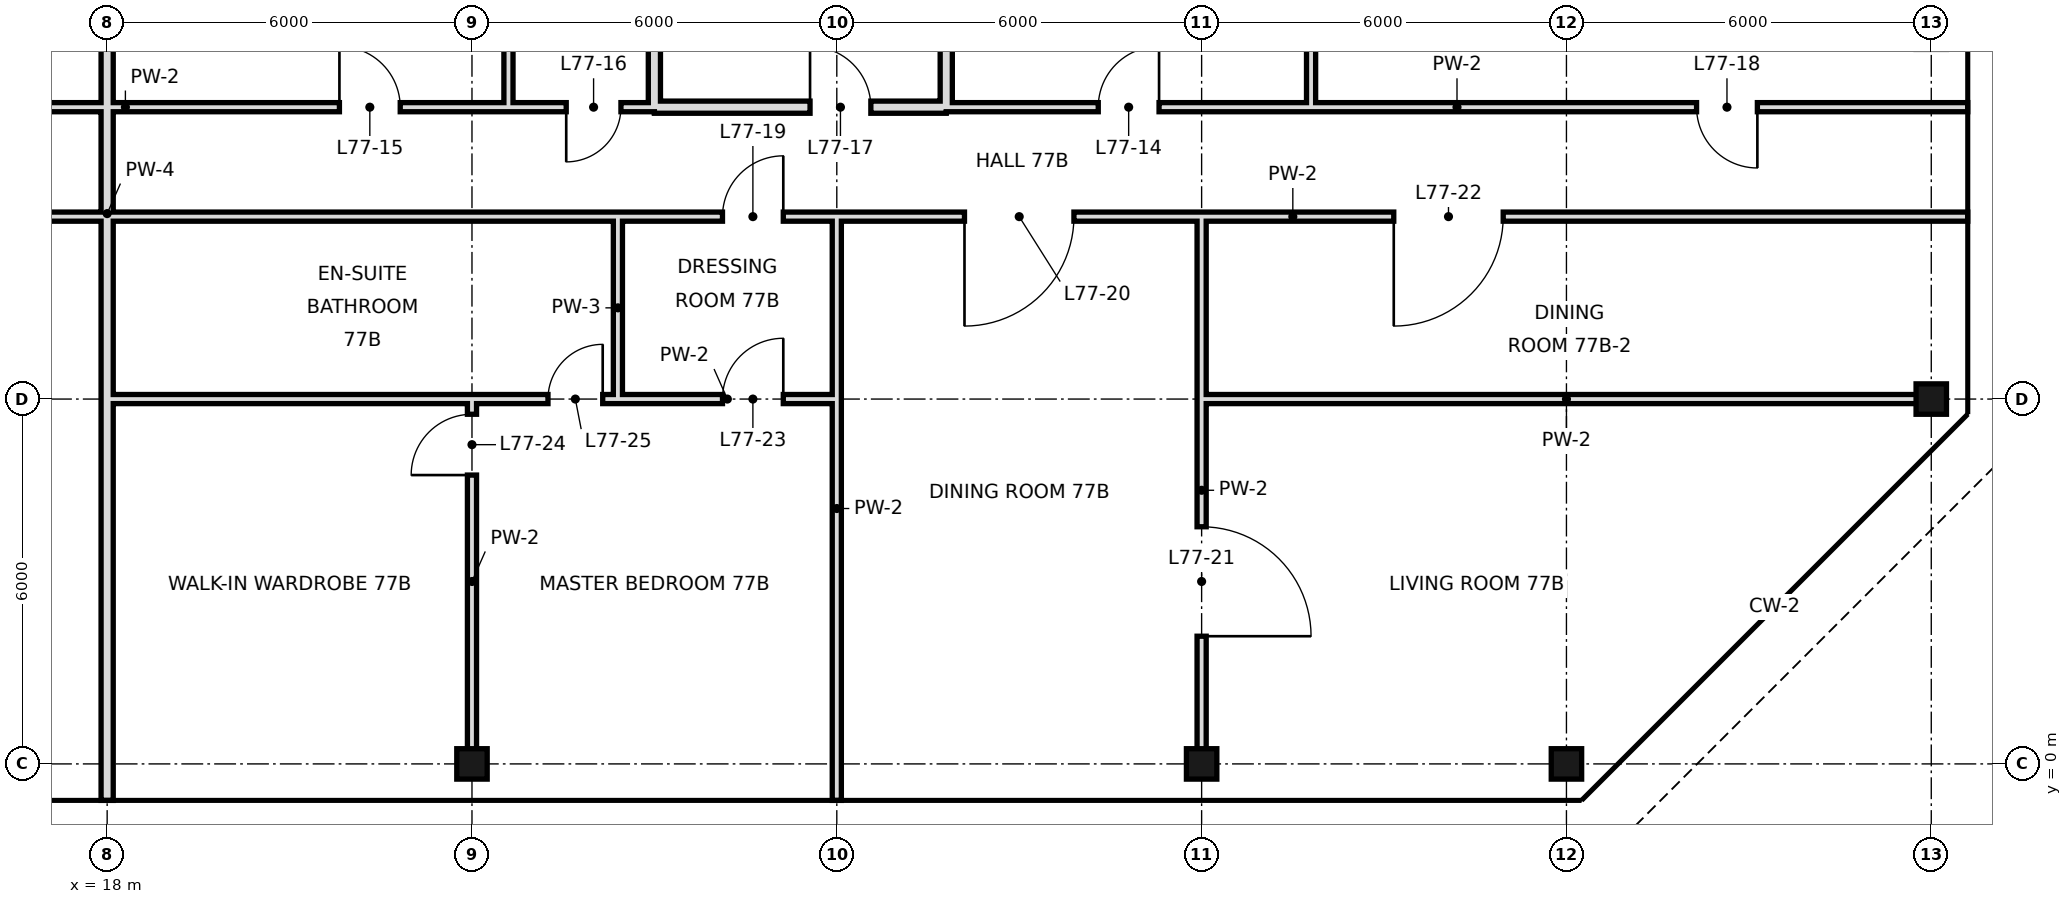
"""IFC4 building model, lengths in metres.
Left out: names, types, materials, properties, quantities, classifications, styles, units other than length and angle.
Written with IfcOpenShell. Run it as: python <this file> out.ifc"""

import sys

from ifc_helpers import new_model, si_unit, direction, frame, frame_2d, origin, origin_2d, place, context, subcontext, project, spatial, rectangle, hollow_rectangle, extrude, element, fill, save


model = new_model("IFC4")
c1 = context("Model", 3, precision=1e-05, world=origin(), true_north=direction((0.0, 1.0)))
c2 = subcontext(c1, "Body", "Model", "MODEL_VIEW")
j1 = project(units=[si_unit("LENGTHUNIT", "METRE"), si_unit("PLANEANGLEUNIT", "RADIAN")], contexts=[c1])
p1 = place(None, origin())
s1 = spatial("IfcSite", under=j1, at=p1, CompositionType="ELEMENT")
p2 = place(p1, origin())
s2 = spatial("IfcBuilding", under=s1, at=p2, CompositionType="ELEMENT")
p3 = place(p2, frame((0.0, 0.0, 323.2)))
s3 = spatial("IfcBuildingStorey", under=s2, at=p3, CompositionType="ELEMENT", Elevation=323.2)
for number, where, z_axis, x_axis in (
    (1, (24.0, 0.0, 0.0), (0.0, 0.0, 1.0), (1.0, 0.0, 0.0)),
    (2, (36.0, 0.0, 0.0), (0.0, 0.0, 1.0), (1.0, 0.0, 0.0)),
    (3, (42.0, 0.0, 0.0), (0.0, 0.0, 1.0), (1.0, 0.0, 0.0)),
    (4, (48.0, 6.0, 0.0), (0.0, 0.0, 1.0), (1.0, 0.0, 0.0)),
):
    element("IfcColumn", number, at=place(p3, frame(where, z_axis=z_axis, x_axis=x_axis)), inside=s3, PredefinedType="COLUMN", context=c2, shape_type="SweptSolid", body=[
        extrude(hollow_rectangle(XDim=0.5, YDim=0.5, WallThickness=0.025, at=origin_2d()), origin(), (0.0, 0.0, 1.0), 3.6),
    ])
p4 = place(p3, frame((18.0, -0.6, 0.0), z_axis=(0.0, 0.0, 1.0), x_axis=(0.0, 1.0, 0.0)))
e5 = element("IfcWall", 5, at=p4, inside=s3, PredefinedType="SOLIDWALL", context=c2, shape_type="SweptSolid", body=[
    extrude(rectangle(XDim=19.3, YDim=0.2, at=frame_2d((9.65, 0.0))), origin(), (0.0, 0.0, 1.0), 2.72),
])
p5 = place(p3, frame((24.0, 0.0, 0.0), z_axis=(0.0, 0.0, 1.0), x_axis=(0.0, 1.0, 0.0)))
e6 = element("IfcWall", 6, at=p5, inside=s3, PredefinedType="PARTITIONING", context=c2, shape_type="SweptSolid", body=[
    extrude(rectangle(XDim=6.0, YDim=0.15, at=frame_2d((3.0, 0.0))), origin(), (0.0, 0.0, 1.0), 2.72),
])
p6 = place(p5, frame((4.75, 0.0, 0.0)))
e7 = element("IfcOpeningElement", 7, at=p6, cuts=e6, PredefinedType="OPENING", context=c2, shape_type="SweptSolid", body=[
    extrude(rectangle(XDim=1.0, YDim=2.4, at=frame_2d((0.5, 1.2))), frame((0.0, 0.085, 0.0), z_axis=(0.0, -1.0, 0.0), x_axis=(1.0, 0.0, 0.0)), (0.0, 0.0, 1.0), 0.17),
])
p7 = place(p3, frame((24.6, 10.8, 0.0), z_axis=(0.0, 0.0, 1.0), x_axis=(0.0, 1.0, 0.0)))
e8 = element("IfcWall", 8, at=p7, inside=s3, PredefinedType="PARTITIONING", context=c2, shape_type="SweptSolid", body=[
    extrude(rectangle(XDim=7.9, YDim=0.15, at=frame_2d((3.95, 0.0))), origin(), (0.0, 0.0, 1.0), 3.42),
])
p8 = place(p3, frame((26.4, 6.0, 0.0), z_axis=(0.0, 0.0, 1.0), x_axis=(0.0, 1.0, 0.0)))
e9 = element("IfcWall", 9, at=p8, inside=s3, PredefinedType="PARTITIONING", context=c2, shape_type="SweptSolid", body=[
    extrude(rectangle(XDim=3.0, YDim=0.15, at=frame_2d((1.5, 0.0))), origin(), (0.0, 0.0, 1.0), 3.42),
])
p9 = place(p3, frame((27.0, 10.8, 0.0), z_axis=(0.0, 0.0, 1.0), x_axis=(0.0, 1.0, 0.0)))
e10 = element("IfcWall", 10, at=p9, inside=s3, PredefinedType="SOLIDWALL", context=c2, shape_type="SweptSolid", body=[
    extrude(rectangle(XDim=7.9, YDim=0.2, at=frame_2d((3.95, 0.0))), origin(), (0.0, 0.0, 1.0), 2.72),
])
p10 = place(p3, frame((30.0, -0.6, 0.0), z_axis=(0.0, 0.0, 1.0), x_axis=(0.0, 1.0, 0.0)))
e11 = element("IfcWall", 11, at=p10, inside=s3, PredefinedType="PARTITIONING", context=c2, shape_type="SweptSolid", body=[
    extrude(rectangle(XDim=9.6, YDim=0.15, at=frame_2d((4.8, 0.0))), origin(), (0.0, 0.0, 1.0), 2.72),
])
p11 = place(p3, frame((31.8, 10.8, 0.0), z_axis=(0.0, 0.0, 1.0), x_axis=(0.0, 1.0, 0.0)))
e12 = element("IfcWall", 12, at=p11, inside=s3, PredefinedType="SOLIDWALL", context=c2, shape_type="SweptSolid", body=[
    extrude(rectangle(XDim=7.9, YDim=0.2, at=frame_2d((3.95, 0.0))), origin(), (0.0, 0.0, 1.0), 3.42),
])
p12 = place(p3, frame((36.0, 0.0, 0.0), z_axis=(0.0, 0.0, 1.0), x_axis=(0.0, 1.0, 0.0)))
e13 = element("IfcWall", 13, at=p12, inside=s3, PredefinedType="PARTITIONING", context=c2, shape_type="SweptSolid", body=[
    extrude(rectangle(XDim=9.0, YDim=0.15, at=frame_2d((4.5, 0.0))), origin(), (0.0, 0.0, 1.0), 2.72),
])
p13 = place(p12, frame((2.1, 0.0, 0.0)))
e14 = element("IfcOpeningElement", 14, at=p13, cuts=e13, PredefinedType="OPENING", context=c2, shape_type="SweptSolid", body=[
    extrude(rectangle(XDim=1.8, YDim=2.4, at=frame_2d((0.9, 1.2))), frame((0.0, 0.085, 0.0), z_axis=(0.0, -1.0, 0.0), x_axis=(1.0, 0.0, 0.0)), (0.0, 0.0, 1.0), 0.17),
])
p14 = place(p3, frame((37.8, 10.8, 0.0), z_axis=(0.0, 0.0, 1.0), x_axis=(0.0, 1.0, 0.0)))
e15 = element("IfcWall", 15, at=p14, inside=s3, PredefinedType="PARTITIONING", context=c2, shape_type="SweptSolid", body=[
    extrude(rectangle(XDim=7.9, YDim=0.15, at=frame_2d((3.95, 0.0))), origin(), (0.0, 0.0, 1.0), 3.42),
])
p15 = place(p3, frame((27.0, 10.8, 0.0), z_axis=(0.0, 0.0, 1.0), x_axis=(1.0, 0.0, 0.0)))
e16 = element("IfcWall", 16, at=p15, inside=s3, PredefinedType="SOLIDWALL", context=c2, shape_type="SweptSolid", body=[
    extrude(rectangle(XDim=4.8, YDim=0.2, at=frame_2d((2.4, 0.0))), origin(), (0.0, 0.0, 1.0), 2.72),
])
p16 = place(p15, frame((2.56, 0.0, 0.0)))
e17 = element("IfcOpeningElement", 17, at=p16, cuts=e16, PredefinedType="OPENING", context=c2, shape_type="SweptSolid", body=[
    extrude(rectangle(XDim=1.0, YDim=2.4, at=frame_2d((0.5, 1.2))), frame((0.0, 0.11, 0.0), z_axis=(0.0, -1.0, 0.0), x_axis=(1.0, 0.0, 0.0)), (0.0, 0.0, 1.0), 0.22),
])
p17 = place(p3, frame((12.0, 10.8, 0.0), z_axis=(0.0, 0.0, 1.0), x_axis=(1.0, 0.0, 0.0)))
e18 = element("IfcWall", 18, at=p17, inside=s3, PredefinedType="PARTITIONING", context=c2, shape_type="SweptSolid", body=[
    extrude(rectangle(XDim=12.6, YDim=0.15, at=frame_2d((6.3, 0.0))), origin(), (0.0, 0.0, 1.0), 3.42),
])
p18 = place(p17, frame((2.5, 0.0, 0.0)))
e19 = element("IfcOpeningElement", 19, at=p18, cuts=e18, PredefinedType="OPENING", context=c2, shape_type="SweptSolid", body=[
    extrude(rectangle(XDim=1.0, YDim=2.4, at=frame_2d((0.5, 1.2))), frame((0.0, 0.085, 0.0), z_axis=(0.0, -1.0, 0.0), x_axis=(1.0, 0.0, 0.0)), (0.0, 0.0, 1.0), 0.17),
])
p19 = place(p17, frame((9.82, 0.0, 0.0)))
e20 = element("IfcOpeningElement", 20, at=p19, cuts=e18, PredefinedType="OPENING", context=c2, shape_type="SweptSolid", body=[
    extrude(rectangle(XDim=1.0, YDim=2.4, at=frame_2d((0.5, 1.2))), frame((0.0, 0.085, 0.0), z_axis=(0.0, -1.0, 0.0), x_axis=(1.0, 0.0, 0.0)), (0.0, 0.0, 1.0), 0.17),
])
p20 = place(p3, frame((31.8, 10.8, 0.0), z_axis=(0.0, 0.0, 1.0), x_axis=(1.0, 0.0, 0.0)))
e21 = element("IfcWall", 21, at=p20, inside=s3, PredefinedType="PARTITIONING", context=c2, shape_type="SweptSolid", body=[
    extrude(rectangle(XDim=16.8, YDim=0.15, at=frame_2d((8.4, 0.0))), origin(), (0.0, 0.0, 1.0), 3.42),
])
p21 = place(p20, frame((2.5, 0.0, 0.0)))
e22 = element("IfcOpeningElement", 22, at=p21, cuts=e21, PredefinedType="OPENING", context=c2, shape_type="SweptSolid", body=[
    extrude(rectangle(XDim=1.0, YDim=2.4, at=frame_2d((0.5, 1.2))), frame((0.0, 0.085, 0.0), z_axis=(0.0, -1.0, 0.0), x_axis=(1.0, 0.0, 0.0)), (0.0, 0.0, 1.0), 0.17),
])
p22 = place(p20, frame((12.34, 0.0, 0.0)))
e23 = element("IfcOpeningElement", 23, at=p22, cuts=e21, PredefinedType="OPENING", context=c2, shape_type="SweptSolid", body=[
    extrude(rectangle(XDim=1.0, YDim=2.4, at=frame_2d((0.5, 1.2))), frame((0.0, 0.085, 0.0), z_axis=(0.0, -1.0, 0.0), x_axis=(1.0, 0.0, 0.0)), (0.0, 0.0, 1.0), 0.17),
])
p23 = place(p3, frame((24.6, 10.8, 0.0), z_axis=(0.0, 0.0, 1.0), x_axis=(1.0, 0.0, 0.0)))
e24 = element("IfcWall", 24, at=p23, inside=s3, PredefinedType="PARTITIONING", context=c2, shape_type="SweptSolid", body=[
    extrude(rectangle(XDim=2.4, YDim=0.15, at=frame_2d((1.2, 0.0))), origin(), (0.0, 0.0, 1.0), 3.42),
])
p24 = place(p23, frame((0.95, 0.0, 0.0)))
e25 = element("IfcOpeningElement", 25, at=p24, cuts=e24, PredefinedType="OPENING", context=c2, shape_type="SweptSolid", body=[
    extrude(rectangle(XDim=0.9, YDim=2.4, at=frame_2d((0.45, 1.2))), frame((0.0, 0.085, 0.0), z_axis=(0.0, -1.0, 0.0), x_axis=(1.0, 0.0, 0.0)), (0.0, 0.0, 1.0), 0.17),
])
p25 = place(p3, frame((26.4, 6.0, 0.0), z_axis=(0.0, 0.0, 1.0), x_axis=(1.0, 0.0, 0.0)))
e26 = element("IfcWall", 26, at=p25, inside=s3, PredefinedType="PARTITIONING", context=c2, shape_type="SweptSolid", body=[
    extrude(rectangle(XDim=3.6, YDim=0.15, at=frame_2d((1.8, 0.0))), origin(), (0.0, 0.0, 1.0), 2.97),
])
p26 = place(p25, frame((1.72, 0.0, 0.0)))
e27 = element("IfcOpeningElement", 27, at=p26, cuts=e26, PredefinedType="OPENING", context=c2, shape_type="SweptSolid", body=[
    extrude(rectangle(XDim=1.0, YDim=2.4, at=frame_2d((0.5, 1.2))), frame((0.0, 0.085, 0.0), z_axis=(0.0, -1.0, 0.0), x_axis=(1.0, 0.0, 0.0)), (0.0, 0.0, 1.0), 0.17),
])
p27 = place(p3, frame((36.0, 6.0, 0.0), z_axis=(0.0, 0.0, 1.0), x_axis=(1.0, 0.0, 0.0)))
e28 = element("IfcWall", 28, at=p27, inside=s3, PredefinedType="PARTITIONING", context=c2, shape_type="SweptSolid", body=[
    extrude(rectangle(XDim=12.0, YDim=0.15, at=frame_2d((6.0, 0.0))), origin(), (0.0, 0.0, 1.0), 2.97),
])
p28 = place(p3, frame((18.0, 6.0, 0.0), z_axis=(0.0, 0.0, 1.0), x_axis=(1.0, 0.0, 0.0)))
e29 = element("IfcWall", 29, at=p28, inside=s3, PredefinedType="PARTITIONING", context=c2, shape_type="SweptSolid", body=[
    extrude(rectangle(XDim=8.4, YDim=0.15, at=frame_2d((4.2, 0.0))), origin(), (0.0, 0.0, 1.0), 2.97),
])
p29 = place(p28, frame((7.25, 0.0, 0.0)))
e30 = element("IfcOpeningElement", 30, at=p29, cuts=e29, PredefinedType="OPENING", context=c2, shape_type="SweptSolid", body=[
    extrude(rectangle(XDim=0.9, YDim=2.4, at=frame_2d((0.45, 1.2))), frame((0.0, 0.085, 0.0), z_axis=(0.0, -1.0, 0.0), x_axis=(1.0, 0.0, 0.0)), (0.0, 0.0, 1.0), 0.17),
])
p30 = place(p3, frame((12.0, 9.0, 0.0), z_axis=(0.0, 0.0, 1.0), x_axis=(1.0, 0.0, 0.0)))
e31 = element("IfcWall", 31, at=p30, inside=s3, PredefinedType="PARTITIONING", context=c2, shape_type="SweptSolid", body=[
    extrude(rectangle(XDim=6.0, YDim=0.15, at=frame_2d((3.0, 0.0))), origin(), (0.0, 0.0, 1.0), 3.42),
])
p31 = place(p30, frame((2.1, 0.0, 0.0)))
e32 = element("IfcOpeningElement", 32, at=p31, cuts=e31, PredefinedType="OPENING", context=c2, shape_type="SweptSolid", body=[
    extrude(rectangle(XDim=1.8, YDim=2.4, at=frame_2d((0.9, 1.2))), frame((0.0, 0.085, 0.0), z_axis=(0.0, -1.0, 0.0), x_axis=(1.0, 0.0, 0.0)), (0.0, 0.0, 1.0), 0.17),
])
p32 = place(p3, frame((26.4, 9.0, 0.0), z_axis=(0.0, 0.0, 1.0), x_axis=(1.0, 0.0, 0.0)))
e33 = element("IfcWall", 33, at=p32, inside=s3, PredefinedType="PARTITIONING", context=c2, shape_type="SweptSolid", body=[
    extrude(rectangle(XDim=22.2, YDim=0.15, at=frame_2d((11.1, 0.0))), origin(), (0.0, 0.0, 1.0), 3.42),
])
p33 = place(p32, frame((1.72, 0.0, 0.0)))
e34 = element("IfcOpeningElement", 34, at=p33, cuts=e33, PredefinedType="OPENING", context=c2, shape_type="SweptSolid", body=[
    extrude(rectangle(XDim=1.0, YDim=2.4, at=frame_2d((0.5, 1.2))), frame((0.0, 0.085, 0.0), z_axis=(0.0, -1.0, 0.0), x_axis=(1.0, 0.0, 0.0)), (0.0, 0.0, 1.0), 0.17),
])
p34 = place(p32, frame((5.7, 0.0, 0.0)))
e35 = element("IfcOpeningElement", 35, at=p34, cuts=e33, PredefinedType="OPENING", context=c2, shape_type="SweptSolid", body=[
    extrude(rectangle(XDim=1.8, YDim=2.4, at=frame_2d((0.9, 1.2))), frame((0.0, 0.085, 0.0), z_axis=(0.0, -1.0, 0.0), x_axis=(1.0, 0.0, 0.0)), (0.0, 0.0, 1.0), 0.17),
])
p35 = place(p32, frame((12.76, 0.0, 0.0)))
e36 = element("IfcOpeningElement", 36, at=p35, cuts=e33, PredefinedType="OPENING", context=c2, shape_type="SweptSolid", body=[
    extrude(rectangle(XDim=1.8, YDim=2.4, at=frame_2d((0.9, 1.2))), frame((0.0, 0.085, 0.0), z_axis=(0.0, -1.0, 0.0), x_axis=(1.0, 0.0, 0.0)), (0.0, 0.0, 1.0), 0.17),
])
p36 = place(p3, frame((18.0, 9.0, 0.0), z_axis=(0.0, 0.0, 1.0), x_axis=(1.0, 0.0, 0.0)))
e37 = element("IfcWall", 37, at=p36, inside=s3, PredefinedType="PARTITIONING", context=c2, shape_type="SweptSolid", body=[
    extrude(rectangle(XDim=8.4, YDim=0.15, at=frame_2d((4.2, 0.0))), origin(), (0.0, 0.0, 1.0), 3.42),
])
p37 = place(p21, frame((1.0, 0.0, 0.0), z_axis=(0.0, 0.0, 1.0), x_axis=(-1.0, 0.0, 0.0)))
e38 = element("IfcDoor", 38, at=p37, inside=s3, OperationType="SINGLE_SWING_LEFT", PredefinedType="DOOR", context=c2, shape_type="SweptSolid", body=[
    extrude(rectangle(XDim=1.0, YDim=2.4, at=frame_2d((0.5, 1.2))), frame((0.0, 0.025, 0.0), z_axis=(0.0, -1.0, 0.0), x_axis=(1.0, 0.0, 0.0)), (0.0, 0.0, 1.0), 0.05),
])
fill(e22, e38)
p38 = place(p19, origin())
e39 = element("IfcDoor", 39, at=p38, inside=s3, OperationType="SINGLE_SWING_LEFT", PredefinedType="DOOR", context=c2, shape_type="SweptSolid", body=[
    extrude(rectangle(XDim=1.0, YDim=2.4, at=frame_2d((0.5, 1.2))), frame((0.0, 0.025, 0.0), z_axis=(0.0, -1.0, 0.0), x_axis=(1.0, 0.0, 0.0)), (0.0, 0.0, 1.0), 0.05),
])
fill(e20, e39)
p39 = place(p24, frame((0.9, 0.0, 0.0), z_axis=(0.0, 0.0, 1.0), x_axis=(-1.0, 0.0, 0.0)))
e40 = element("IfcDoor", 40, at=p39, inside=s3, OperationType="SINGLE_SWING_RIGHT", PredefinedType="DOOR", context=c2, shape_type="SweptSolid", body=[
    extrude(rectangle(XDim=0.9, YDim=2.4, at=frame_2d((0.45, 1.2))), frame((0.0, 0.025, 0.0), z_axis=(0.0, -1.0, 0.0), x_axis=(1.0, 0.0, 0.0)), (0.0, 0.0, 1.0), 0.05),
])
fill(e25, e40)
p40 = place(p16, origin())
e41 = element("IfcDoor", 41, at=p40, inside=s3, OperationType="SINGLE_SWING_LEFT", PredefinedType="DOOR", context=c2, shape_type="SweptSolid", body=[
    extrude(rectangle(XDim=1.0, YDim=2.4, at=frame_2d((0.5, 1.2))), frame((0.0, 0.025, 0.0), z_axis=(0.0, -1.0, 0.0), x_axis=(1.0, 0.0, 0.0)), (0.0, 0.0, 1.0), 0.05),
])
fill(e17, e41)
p41 = place(p22, origin())
e42 = element("IfcDoor", 42, at=p41, inside=s3, OperationType="SINGLE_SWING_RIGHT", PredefinedType="DOOR", context=c2, shape_type="SweptSolid", body=[
    extrude(rectangle(XDim=1.0, YDim=2.4, at=frame_2d((0.5, 1.2))), frame((0.0, 0.025, 0.0), z_axis=(0.0, -1.0, 0.0), x_axis=(1.0, 0.0, 0.0)), (0.0, 0.0, 1.0), 0.05),
])
fill(e23, e42)
p42 = place(p33, frame((1.0, 0.0, 0.0), z_axis=(0.0, 0.0, 1.0), x_axis=(-1.0, 0.0, 0.0)))
e43 = element("IfcDoor", 43, at=p42, inside=s3, OperationType="SINGLE_SWING_LEFT", PredefinedType="DOOR", context=c2, shape_type="SweptSolid", body=[
    extrude(rectangle(XDim=1.0, YDim=2.4, at=frame_2d((0.5, 1.2))), frame((0.0, 0.025, 0.0), z_axis=(0.0, -1.0, 0.0), x_axis=(1.0, 0.0, 0.0)), (0.0, 0.0, 1.0), 0.05),
])
fill(e34, e43)
p43 = place(p34, frame((1.8, 0.0, 0.0), z_axis=(0.0, 0.0, 1.0), x_axis=(-1.0, 0.0, 0.0)))
e44 = element("IfcDoor", 44, at=p43, inside=s3, OperationType="SINGLE_SWING_RIGHT", PredefinedType="DOOR", context=c2, shape_type="SweptSolid", body=[
    extrude(rectangle(XDim=1.8, YDim=2.4, at=frame_2d((0.9, 1.2))), frame((0.0, 0.025, 0.0), z_axis=(0.0, -1.0, 0.0), x_axis=(1.0, 0.0, 0.0)), (0.0, 0.0, 1.0), 0.05),
])
fill(e35, e44)
p44 = place(p13, frame((1.8, 0.0, 0.0), z_axis=(0.0, 0.0, 1.0), x_axis=(-1.0, 0.0, 0.0)))
e45 = element("IfcDoor", 45, at=p44, inside=s3, OperationType="SINGLE_SWING_RIGHT", PredefinedType="DOOR", context=c2, shape_type="SweptSolid", body=[
    extrude(rectangle(XDim=1.8, YDim=2.4, at=frame_2d((0.9, 1.2))), frame((0.0, 0.025, 0.0), z_axis=(0.0, -1.0, 0.0), x_axis=(1.0, 0.0, 0.0)), (0.0, 0.0, 1.0), 0.05),
])
fill(e14, e45)
p45 = place(p35, frame((1.8, 0.0, 0.0), z_axis=(0.0, 0.0, 1.0), x_axis=(-1.0, 0.0, 0.0)))
e46 = element("IfcDoor", 46, at=p45, inside=s3, OperationType="SINGLE_SWING_RIGHT", PredefinedType="DOOR", context=c2, shape_type="SweptSolid", body=[
    extrude(rectangle(XDim=1.8, YDim=2.4, at=frame_2d((0.9, 1.2))), frame((0.0, 0.025, 0.0), z_axis=(0.0, -1.0, 0.0), x_axis=(1.0, 0.0, 0.0)), (0.0, 0.0, 1.0), 0.05),
])
fill(e36, e46)
p46 = place(p26, frame((1.0, 0.0, 0.0), z_axis=(0.0, 0.0, 1.0), x_axis=(-1.0, 0.0, 0.0)))
e47 = element("IfcDoor", 47, at=p46, inside=s3, OperationType="SINGLE_SWING_LEFT", PredefinedType="DOOR", context=c2, shape_type="SweptSolid", body=[
    extrude(rectangle(XDim=1.0, YDim=2.4, at=frame_2d((0.5, 1.2))), frame((0.0, 0.025, 0.0), z_axis=(0.0, -1.0, 0.0), x_axis=(1.0, 0.0, 0.0)), (0.0, 0.0, 1.0), 0.05),
])
fill(e27, e47)
p47 = place(p6, origin())
e48 = element("IfcDoor", 48, at=p47, inside=s3, OperationType="SINGLE_SWING_LEFT", PredefinedType="DOOR", context=c2, shape_type="SweptSolid", body=[
    extrude(rectangle(XDim=1.0, YDim=2.4, at=frame_2d((0.5, 1.2))), frame((0.0, 0.025, 0.0), z_axis=(0.0, -1.0, 0.0), x_axis=(1.0, 0.0, 0.0)), (0.0, 0.0, 1.0), 0.05),
])
fill(e7, e48)
p48 = place(p29, frame((0.9, 0.0, 0.0), z_axis=(0.0, 0.0, 1.0), x_axis=(-1.0, 0.0, 0.0)))
e49 = element("IfcDoor", 49, at=p48, inside=s3, OperationType="SINGLE_SWING_LEFT", PredefinedType="DOOR", context=c2, shape_type="SweptSolid", body=[
    extrude(rectangle(XDim=0.9, YDim=2.4, at=frame_2d((0.45, 1.2))), frame((0.0, 0.025, 0.0), z_axis=(0.0, -1.0, 0.0), x_axis=(1.0, 0.0, 0.0)), (0.0, 0.0, 1.0), 0.05),
])
fill(e30, e49)
save(model, sys.argv[1])
